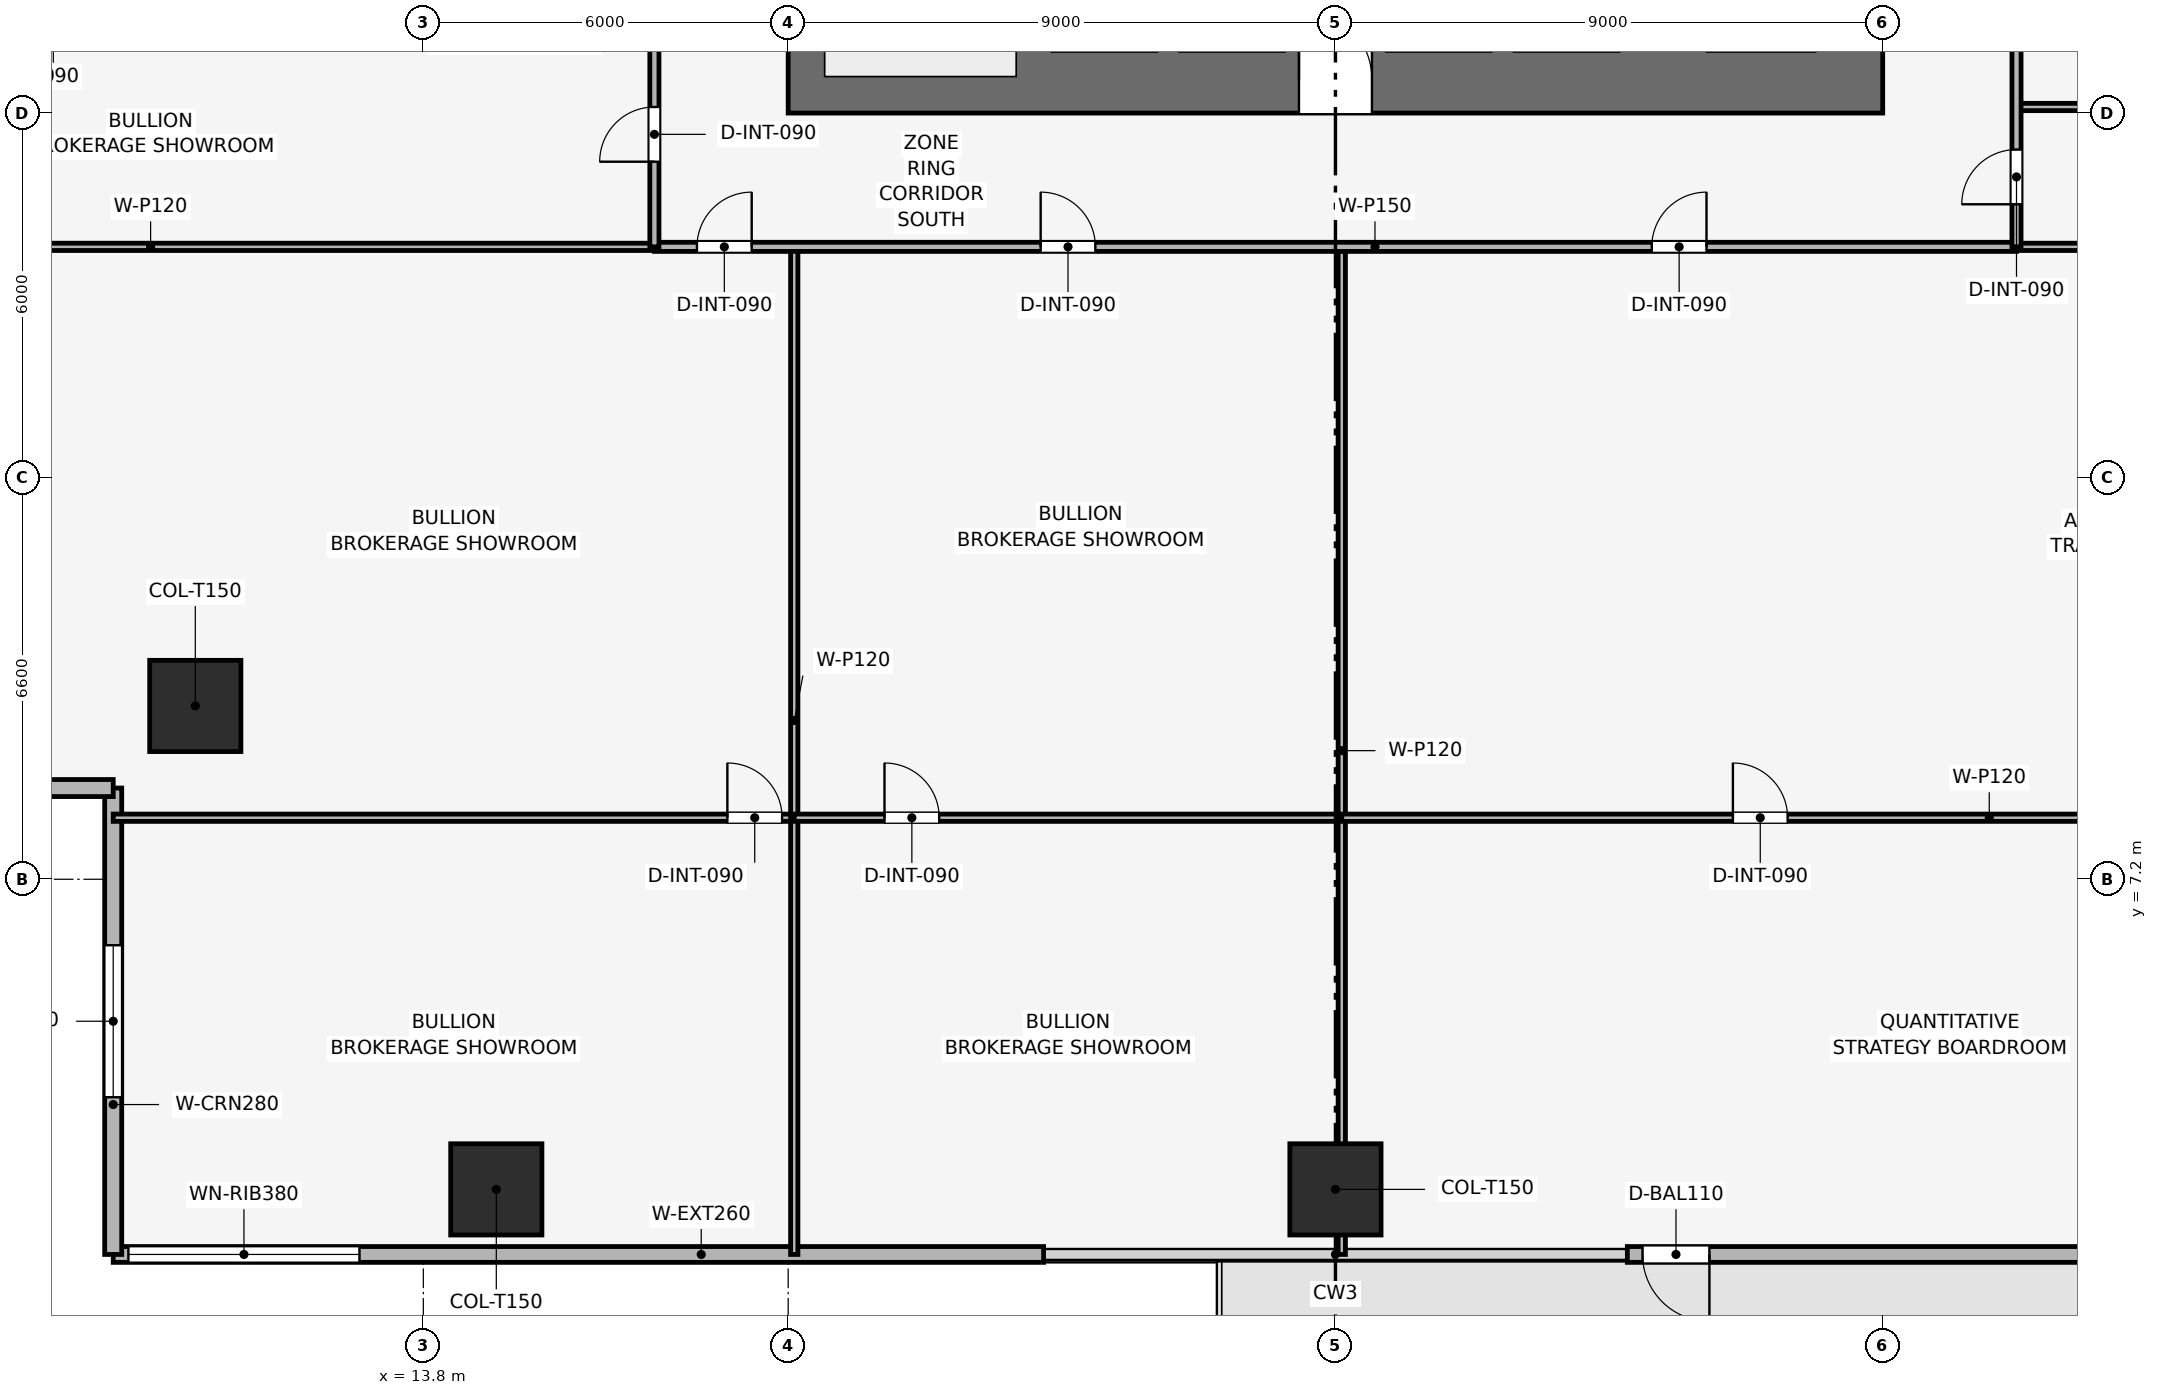
"""IFC4 building model, lengths in metres.
Left out: names, types, materials, properties, quantities, classifications, styles, units other than length and angle.
Written with IfcOpenShell. Run it as: python <this file> out.ifc"""

import sys

from ifc_helpers import new_model, si_unit, direction, frame, frame_2d, origin, origin_2d, place, context, subcontext, project, spatial, rectangle, extrude, element, fill, save


model = new_model("IFC4")
c1 = context("Model", 3, precision=1e-05, world=origin(), true_north=direction((0.0, 1.0)))
c2 = subcontext(c1, "Body", "Model", "MODEL_VIEW")
j1 = project(units=[si_unit("LENGTHUNIT", "METRE"), si_unit("PLANEANGLEUNIT", "RADIAN")], contexts=[c1])
p1 = place(None, origin())
s1 = spatial("IfcSite", under=j1, at=p1, CompositionType="ELEMENT")
p2 = place(p1, origin())
s2 = spatial("IfcBuilding", under=s1, at=p2, CompositionType="ELEMENT")
p3 = place(p2, frame((0.0, 0.0, 49.5)))
s3 = spatial("IfcBuildingStorey", under=s2, at=p3, CompositionType="ELEMENT", Elevation=49.5)
p4 = place(p3, frame((19.8, 20.35, 0.0), z_axis=(0.0, 0.0, 1.0), x_axis=(1.0, 0.0, 0.0)))
e1 = element("IfcWall", 1, at=p4, inside=s3, PredefinedType="SHEAR", context=c2, shape_type="SweptSolid", body=[
    extrude(rectangle(XDim=18.0, YDim=1.1, at=frame_2d((9.0, 0.0))), origin(), (0.0, 0.0, 1.0), 3.9),
])
p5 = place(p4, frame((8.4, 0.0, 0.0)))
e2 = element("IfcOpeningElement", 2, at=p5, cuts=e1, PredefinedType="OPENING", context=c2, shape_type="SweptSolid", body=[
    extrude(rectangle(XDim=1.2, YDim=2.2, at=frame_2d((0.6, 1.1))), frame((0.0, 0.56, 0.0), z_axis=(0.0, -1.0, 0.0), x_axis=(1.0, 0.0, 0.0)), (0.0, 0.0, 1.0), 1.12),
])
for number, where, z_axis, x_axis in (
    (3, (15.0, 2.1, 0.003), (0.0, 0.0, 1.0), (1.0, 0.0, 0.0)),
    (4, (28.8, 2.1, 0.003), (0.0, 0.0, 1.0), (1.0, 0.0, 0.0)),
    (5, (10.05, 10.05, 0.003), (0.0, 0.0, 1.0), (1.0, 0.0, 0.0)),
):
    element("IfcColumn", number, at=place(p3, frame(where, z_axis=z_axis, x_axis=x_axis)), inside=s3, PredefinedType="COLUMN", context=c2, shape_type="SweptSolid", body=[
        extrude(rectangle(XDim=1.5, YDim=1.5, at=origin_2d()), origin(), (0.0, 0.0, 1.0), 3.644),
    ])
p6 = place(p3, frame((48.9, 1.03, 0.0), z_axis=(0.0, 0.0, 1.0), x_axis=(-1.0, 0.0, 0.0)))
e6 = element("IfcWall", 6, at=p6, inside=s3, PredefinedType="SOLIDWALL", context=c2, shape_type="SweptSolid", body=[
    extrude(rectangle(XDim=15.3, YDim=0.26, at=frame_2d((7.65, 0.0))), origin(), (0.0, 0.0, 1.0), 3.65),
])
p7 = place(p6, frame((13.95, 0.0, 0.0)))
e7 = element("IfcOpeningElement", 7, at=p7, cuts=e6, PredefinedType="OPENING", context=c2, shape_type="SweptSolid", body=[
    extrude(rectangle(XDim=1.1, YDim=2.2, at=frame_2d((0.55, 1.1))), frame((0.0, 0.14, 0.0), z_axis=(0.0, -1.0, 0.0), x_axis=(1.0, 0.0, 0.0)), (0.0, 0.0, 1.0), 0.28),
])
p8 = place(p3, frame((24.0, 1.03, 0.0), z_axis=(0.0, 0.0, 1.0), x_axis=(-1.0, 0.0, 0.0)))
e8 = element("IfcWall", 8, at=p8, inside=s3, PredefinedType="SOLIDWALL", context=c2, shape_type="SweptSolid", body=[
    extrude(rectangle(XDim=15.3, YDim=0.26, at=frame_2d((7.65, 0.0))), origin(), (0.0, 0.0, 1.0), 3.65),
])
p9 = place(p8, frame((11.25, 0.0, 0.9)))
e9 = element("IfcOpeningElement", 9, at=p9, cuts=e8, PredefinedType="OPENING", context=c2, shape_type="SweptSolid", body=[
    extrude(rectangle(XDim=3.8, YDim=1.9, at=frame_2d((1.9, 0.95))), frame((0.0, 0.14, 0.0), z_axis=(0.0, -1.0, 0.0), x_axis=(1.0, 0.0, 0.0)), (0.0, 0.0, 1.0), 0.28),
])
p10 = place(p3, frame((8.7, 1.03, 0.0), z_axis=(0.0, 0.0, 1.0), x_axis=(0.0, 1.0, 0.0)))
e10 = element("IfcWall", 10, at=p10, inside=s3, PredefinedType="SOLIDWALL", context=c2, shape_type="SweptSolid", body=[
    extrude(rectangle(XDim=7.67, YDim=0.28, at=frame_2d((3.835, 0.0))), origin(), (0.0, 0.0, 1.0), 3.65),
])
p11 = place(p10, frame((2.585, 0.0, 0.9)))
e11 = element("IfcOpeningElement", 11, at=p11, cuts=e10, PredefinedType="OPENING", context=c2, shape_type="SweptSolid", body=[
    extrude(rectangle(XDim=2.5, YDim=1.9, at=frame_2d((1.25, 0.95))), frame((0.0, 0.15, 0.0), z_axis=(0.0, -1.0, 0.0), x_axis=(1.0, 0.0, 0.0)), (0.0, 0.0, 1.0), 0.3),
])
p12 = place(p3, frame((8.7, 8.7, 0.0), z_axis=(0.0, 0.0, 1.0), x_axis=(-1.0, 0.0, 0.0)))
e12 = element("IfcWall", 12, at=p12, inside=s3, PredefinedType="SOLIDWALL", context=c2, shape_type="SweptSolid", body=[
    extrude(rectangle(XDim=7.67, YDim=0.28, at=frame_2d((3.835, 0.0))), origin(), (0.0, 0.0, 1.0), 3.65),
])
p13 = place(p12, frame((2.585, 0.0, 0.9)))
e13 = element("IfcOpeningElement", 13, at=p13, cuts=e12, PredefinedType="OPENING", context=c2, shape_type="SweptSolid", body=[
    extrude(rectangle(XDim=2.5, YDim=1.9, at=frame_2d((1.25, 0.95))), frame((0.0, 0.15, 0.0), z_axis=(0.0, -1.0, 0.0), x_axis=(1.0, 0.0, 0.0)), (0.0, 0.0, 1.0), 0.3),
])
p14 = place(p3, frame((8.7, 8.212, 0.0), z_axis=(0.0, 0.0, 1.0), x_axis=(1.0, 0.0, 0.0)))
e14 = element("IfcWall", 14, at=p14, inside=s3, PredefinedType="PARTITIONING", context=c2, shape_type="SweptSolid", body=[
    extrude(rectangle(XDim=11.2, YDim=0.12, at=frame_2d((5.6, 0.0))), origin(), (0.0, 0.0, 1.0), 2.935),
])
p15 = place(p14, frame((10.1, 0.0, 0.0)))
e15 = element("IfcOpeningElement", 15, at=p15, cuts=e14, PredefinedType="OPENING", context=c2, shape_type="SweptSolid", body=[
    extrude(rectangle(XDim=0.9, YDim=2.1, at=frame_2d((0.45, 1.05))), frame((0.0, 0.07, 0.0), z_axis=(0.0, -1.0, 0.0), x_axis=(1.0, 0.0, 0.0)), (0.0, 0.0, 1.0), 0.14),
])
p16 = place(p3, frame((19.9, 1.03, 0.0), z_axis=(0.0, 0.0, 1.0), x_axis=(0.0, 1.0, 0.0)))
e16 = element("IfcWall", 16, at=p16, inside=s3, PredefinedType="PARTITIONING", context=c2, shape_type="SweptSolid", body=[
    extrude(rectangle(XDim=16.57, YDim=0.12, at=frame_2d((8.285, 0.0))), origin(), (0.0, 0.0, 1.0), 2.935),
])
p17 = place(p3, frame((19.9, 8.212, 0.0), z_axis=(0.0, 0.0, 1.0), x_axis=(1.0, 0.0, 0.0)))
e17 = element("IfcWall", 17, at=p17, inside=s3, PredefinedType="PARTITIONING", context=c2, shape_type="SweptSolid", body=[
    extrude(rectangle(XDim=9.004, YDim=0.12, at=frame_2d((4.502, 0.0))), origin(), (0.0, 0.0, 1.0), 3.085),
])
p18 = place(p17, frame((1.484, 0.0, 0.0)))
e18 = element("IfcOpeningElement", 18, at=p18, cuts=e17, PredefinedType="OPENING", context=c2, shape_type="SweptSolid", body=[
    extrude(rectangle(XDim=0.9, YDim=2.1, at=frame_2d((0.45, 1.05))), frame((0.0, 0.07, 0.0), z_axis=(0.0, -1.0, 0.0), x_axis=(1.0, 0.0, 0.0)), (0.0, 0.0, 1.0), 0.14),
])
p19 = place(p3, frame((28.904, 1.03, 0.0), z_axis=(0.0, 0.0, 1.0), x_axis=(0.0, 1.0, 0.0)))
e19 = element("IfcWall", 19, at=p19, inside=s3, PredefinedType="PARTITIONING", context=c2, shape_type="SweptSolid", body=[
    extrude(rectangle(XDim=16.57, YDim=0.12, at=frame_2d((8.285, 0.0))), origin(), (0.0, 0.0, 1.0), 3.085),
])
p20 = place(p3, frame((28.904, 8.212, 0.0), z_axis=(0.0, 0.0, 1.0), x_axis=(1.0, 0.0, 0.0)))
e20 = element("IfcWall", 20, at=p20, inside=s3, PredefinedType="PARTITIONING", context=c2, shape_type="SweptSolid", body=[
    extrude(rectangle(XDim=19.996, YDim=0.12, at=frame_2d((9.998, 0.0))), origin(), (0.0, 0.0, 1.0), 2.935),
])
p21 = place(p20, frame((6.432, 0.0, 0.0)))
e21 = element("IfcOpeningElement", 21, at=p21, cuts=e20, PredefinedType="OPENING", context=c2, shape_type="SweptSolid", body=[
    extrude(rectangle(XDim=0.9, YDim=2.1, at=frame_2d((0.45, 1.05))), frame((0.0, 0.07, 0.0), z_axis=(0.0, -1.0, 0.0), x_axis=(1.0, 0.0, 0.0)), (0.0, 0.0, 1.0), 0.14),
])
for number, where, z_axis, x_axis in (
    (22, (1.03, 17.6, 0.0), (0.0, 0.0, 1.0), (1.0, 0.0, 0.0)),
    (23, (40.0, 17.6, 0.0), (0.0, 0.0, 1.0), (1.0, 0.0, 0.0)),
    (24, (40.0, 19.9, 0.0), (0.0, 0.0, 1.0), (1.0, 0.0, 0.0)),
):
    element("IfcWall", number, at=place(p3, frame(where, z_axis=z_axis, x_axis=x_axis)), inside=s3, PredefinedType="PARTITIONING", context=c2, shape_type="SweptSolid", body=[
        extrude(rectangle(XDim=16.57, YDim=0.12, at=frame_2d((8.285, 0.0))), origin(), (0.0, 0.0, 1.0), 2.935),
    ])
p22 = place(p3, frame((17.6, 17.6, 0.0), z_axis=(0.0, 0.0, 1.0), x_axis=(1.0, 0.0, 0.0)))
e25 = element("IfcWall", 25, at=p22, inside=s3, PredefinedType="PARTITIONING", context=c2, shape_type="SweptSolid", body=[
    extrude(rectangle(XDim=22.4, YDim=0.15, at=frame_2d((11.2, 0.0))), origin(), (0.0, 0.0, 1.0), 3.085),
])
p23 = place(p22, frame((0.7, 0.0, 0.0)))
e26 = element("IfcOpeningElement", 26, at=p23, cuts=e25, PredefinedType="OPENING", context=c2, shape_type="SweptSolid", body=[
    extrude(rectangle(XDim=0.9, YDim=2.1, at=frame_2d((0.45, 1.05))), frame((0.0, 0.085, 0.0), z_axis=(0.0, -1.0, 0.0), x_axis=(1.0, 0.0, 0.0)), (0.0, 0.0, 1.0), 0.17),
])
p24 = place(p22, frame((6.352, 0.0, 0.0)))
e27 = element("IfcOpeningElement", 27, at=p24, cuts=e25, PredefinedType="OPENING", context=c2, shape_type="SweptSolid", body=[
    extrude(rectangle(XDim=0.9, YDim=2.1, at=frame_2d((0.45, 1.05))), frame((0.0, 0.085, 0.0), z_axis=(0.0, -1.0, 0.0), x_axis=(1.0, 0.0, 0.0)), (0.0, 0.0, 1.0), 0.17),
])
p25 = place(p22, frame((16.402, 0.0, 0.0)))
e28 = element("IfcOpeningElement", 28, at=p25, cuts=e25, PredefinedType="OPENING", context=c2, shape_type="SweptSolid", body=[
    extrude(rectangle(XDim=0.9, YDim=2.1, at=frame_2d((0.45, 1.05))), frame((0.0, 0.085, 0.0), z_axis=(0.0, -1.0, 0.0), x_axis=(1.0, 0.0, 0.0)), (0.0, 0.0, 1.0), 0.17),
])
p26 = place(p3, frame((17.6, 17.6, 0.0), z_axis=(0.0, 0.0, 1.0), x_axis=(0.0, 1.0, 0.0)))
e29 = element("IfcWall", 29, at=p26, inside=s3, PredefinedType="PARTITIONING", context=c2, shape_type="SweptSolid", body=[
    extrude(rectangle(XDim=22.4, YDim=0.15, at=frame_2d((11.2, 0.0))), origin(), (0.0, 0.0, 1.0), 3.085),
])
p27 = place(p26, frame((1.4, 0.0, 0.0)))
e30 = element("IfcOpeningElement", 30, at=p27, cuts=e29, PredefinedType="OPENING", context=c2, shape_type="SweptSolid", body=[
    extrude(rectangle(XDim=0.9, YDim=2.1, at=frame_2d((0.45, 1.05))), frame((0.0, 0.085, 0.0), z_axis=(0.0, -1.0, 0.0), x_axis=(1.0, 0.0, 0.0)), (0.0, 0.0, 1.0), 0.17),
])
p28 = place(p26, frame((4.65, 0.0, 0.0)))
e31 = element("IfcOpeningElement", 31, at=p28, cuts=e29, PredefinedType="OPENING", context=c2, shape_type="SweptSolid", body=[
    extrude(rectangle(XDim=0.9, YDim=2.1, at=frame_2d((0.45, 1.05))), frame((0.0, 0.085, 0.0), z_axis=(0.0, -1.0, 0.0), x_axis=(1.0, 0.0, 0.0)), (0.0, 0.0, 1.0), 0.17),
])
p29 = place(p26, frame((7.55, 0.0, 0.0)))
e32 = element("IfcOpeningElement", 32, at=p29, cuts=e29, PredefinedType="OPENING", context=c2, shape_type="SweptSolid", body=[
    extrude(rectangle(XDim=0.9, YDim=2.1, at=frame_2d((0.45, 1.05))), frame((0.0, 0.085, 0.0), z_axis=(0.0, -1.0, 0.0), x_axis=(1.0, 0.0, 0.0)), (0.0, 0.0, 1.0), 0.17),
])
p30 = place(p26, frame((10.3, 0.0, 0.0)))
e33 = element("IfcOpeningElement", 33, at=p30, cuts=e29, PredefinedType="OPENING", context=c2, shape_type="SweptSolid", body=[
    extrude(rectangle(XDim=0.95, YDim=2.1, at=frame_2d((0.475, 1.05))), frame((0.0, 0.085, 0.0), z_axis=(0.0, -1.0, 0.0), x_axis=(1.0, 0.0, 0.0)), (0.0, 0.0, 1.0), 0.17),
])
p31 = place(p26, frame((16.8, 0.0, 0.0)))
e34 = element("IfcOpeningElement", 34, at=p31, cuts=e29, PredefinedType="OPENING", context=c2, shape_type="SweptSolid", body=[
    extrude(rectangle(XDim=0.9, YDim=2.1, at=frame_2d((0.45, 1.05))), frame((0.0, 0.085, 0.0), z_axis=(0.0, -1.0, 0.0), x_axis=(1.0, 0.0, 0.0)), (0.0, 0.0, 1.0), 0.17),
])
p32 = place(p3, frame((40.0, 17.6, 0.0), z_axis=(0.0, 0.0, 1.0), x_axis=(0.0, 1.0, 0.0)))
e35 = element("IfcWall", 35, at=p32, inside=s3, PredefinedType="PARTITIONING", context=c2, shape_type="SweptSolid", body=[
    extrude(rectangle(XDim=22.4, YDim=0.15, at=frame_2d((11.2, 0.0))), origin(), (0.0, 0.0, 1.0), 3.085),
])
p33 = place(p32, frame((0.7, 0.0, 0.0)))
e36 = element("IfcOpeningElement", 36, at=p33, cuts=e35, PredefinedType="OPENING", context=c2, shape_type="SweptSolid", body=[
    extrude(rectangle(XDim=0.9, YDim=2.1, at=frame_2d((0.45, 1.05))), frame((0.0, 0.085, 0.0), z_axis=(0.0, -1.0, 0.0), x_axis=(1.0, 0.0, 0.0)), (0.0, 0.0, 1.0), 0.17),
])
p34 = place(p32, frame((4.927, 0.0, 0.0)))
e37 = element("IfcOpeningElement", 37, at=p34, cuts=e35, PredefinedType="OPENING", context=c2, shape_type="SweptSolid", body=[
    extrude(rectangle(XDim=0.9, YDim=2.1, at=frame_2d((0.45, 1.05))), frame((0.0, 0.085, 0.0), z_axis=(0.0, -1.0, 0.0), x_axis=(1.0, 0.0, 0.0)), (0.0, 0.0, 1.0), 0.17),
])
p35 = place(p32, frame((10.886, 0.0, 0.0)))
e38 = element("IfcOpeningElement", 38, at=p35, cuts=e35, PredefinedType="OPENING", context=c2, shape_type="SweptSolid", body=[
    extrude(rectangle(XDim=0.9, YDim=2.1, at=frame_2d((0.45, 1.05))), frame((0.0, 0.085, 0.0), z_axis=(0.0, -1.0, 0.0), x_axis=(1.0, 0.0, 0.0)), (0.0, 0.0, 1.0), 0.17),
])
p36 = place(p32, frame((17.859, 0.0, 0.0)))
e39 = element("IfcOpeningElement", 39, at=p36, cuts=e35, PredefinedType="OPENING", context=c2, shape_type="SweptSolid", body=[
    extrude(rectangle(XDim=0.9, YDim=2.1, at=frame_2d((0.45, 1.05))), frame((0.0, 0.085, 0.0), z_axis=(0.0, -1.0, 0.0), x_axis=(1.0, 0.0, 0.0)), (0.0, 0.0, 1.0), 0.17),
])
p37 = place(p7, origin())
e40 = element("IfcDoor", 40, at=p37, inside=s3, OperationType="SINGLE_SWING_LEFT", PredefinedType="DOOR", context=c2, shape_type="SweptSolid", body=[
    extrude(rectangle(XDim=1.1, YDim=2.2, at=frame_2d((0.55, 1.1))), frame((0.0, 0.025, 0.0), z_axis=(0.0, -1.0, 0.0), x_axis=(1.0, 0.0, 0.0)), (0.0, 0.0, 1.0), 0.05),
])
fill(e7, e40)
p38 = place(p9, origin())
e41 = element("IfcWindow", 41, at=p38, inside=s3, PartitioningType="SINGLE_PANEL", PredefinedType="WINDOW", context=c2, shape_type="SweptSolid", body=[
    extrude(rectangle(XDim=3.8, YDim=1.9, at=frame_2d((1.9, 0.95))), frame((0.0, 0.03, 0.0), z_axis=(0.0, -1.0, 0.0), x_axis=(1.0, 0.0, 0.0)), (0.0, 0.0, 1.0), 0.06),
])
fill(e9, e41)
p39 = place(p11, origin())
e42 = element("IfcWindow", 42, at=p39, inside=s3, PartitioningType="SINGLE_PANEL", PredefinedType="WINDOW", context=c2, shape_type="SweptSolid", body=[
    extrude(rectangle(XDim=2.5, YDim=1.9, at=frame_2d((1.25, 0.95))), frame((0.0, 0.03, 0.0), z_axis=(0.0, -1.0, 0.0), x_axis=(1.0, 0.0, 0.0)), (0.0, 0.0, 1.0), 0.06),
])
fill(e11, e42)
p40 = place(p15, origin())
e43 = element("IfcDoor", 43, at=p40, inside=s3, OperationType="SINGLE_SWING_LEFT", PredefinedType="DOOR", context=c2, shape_type="SweptSolid", body=[
    extrude(rectangle(XDim=0.9, YDim=2.1, at=frame_2d((0.45, 1.05))), frame((0.0, 0.025, 0.0), z_axis=(0.0, -1.0, 0.0), x_axis=(1.0, 0.0, 0.0)), (0.0, 0.0, 1.0), 0.05),
])
fill(e15, e43)
p41 = place(p18, origin())
e44 = element("IfcDoor", 44, at=p41, inside=s3, OperationType="SINGLE_SWING_LEFT", PredefinedType="DOOR", context=c2, shape_type="SweptSolid", body=[
    extrude(rectangle(XDim=0.9, YDim=2.1, at=frame_2d((0.45, 1.05))), frame((0.0, 0.025, 0.0), z_axis=(0.0, -1.0, 0.0), x_axis=(1.0, 0.0, 0.0)), (0.0, 0.0, 1.0), 0.05),
])
fill(e18, e44)
p42 = place(p21, origin())
e45 = element("IfcDoor", 45, at=p42, inside=s3, OperationType="SINGLE_SWING_LEFT", PredefinedType="DOOR", context=c2, shape_type="SweptSolid", body=[
    extrude(rectangle(XDim=0.9, YDim=2.1, at=frame_2d((0.45, 1.05))), frame((0.0, 0.025, 0.0), z_axis=(0.0, -1.0, 0.0), x_axis=(1.0, 0.0, 0.0)), (0.0, 0.0, 1.0), 0.05),
])
fill(e21, e45)
p43 = place(p23, origin())
e46 = element("IfcDoor", 46, at=p43, inside=s3, OperationType="SINGLE_SWING_RIGHT", PredefinedType="DOOR", context=c2, shape_type="SweptSolid", body=[
    extrude(rectangle(XDim=0.9, YDim=2.1, at=frame_2d((0.45, 1.05))), frame((0.0, 0.025, 0.0), z_axis=(0.0, -1.0, 0.0), x_axis=(1.0, 0.0, 0.0)), (0.0, 0.0, 1.0), 0.05),
])
fill(e26, e46)
p44 = place(p24, origin())
e47 = element("IfcDoor", 47, at=p44, inside=s3, OperationType="SINGLE_SWING_LEFT", PredefinedType="DOOR", context=c2, shape_type="SweptSolid", body=[
    extrude(rectangle(XDim=0.9, YDim=2.1, at=frame_2d((0.45, 1.05))), frame((0.0, 0.025, 0.0), z_axis=(0.0, -1.0, 0.0), x_axis=(1.0, 0.0, 0.0)), (0.0, 0.0, 1.0), 0.05),
])
fill(e27, e47)
p45 = place(p25, origin())
e48 = element("IfcDoor", 48, at=p45, inside=s3, OperationType="SINGLE_SWING_RIGHT", PredefinedType="DOOR", context=c2, shape_type="SweptSolid", body=[
    extrude(rectangle(XDim=0.9, YDim=2.1, at=frame_2d((0.45, 1.05))), frame((0.0, 0.025, 0.0), z_axis=(0.0, -1.0, 0.0), x_axis=(1.0, 0.0, 0.0)), (0.0, 0.0, 1.0), 0.05),
])
fill(e28, e48)
p46 = place(p27, origin())
e49 = element("IfcDoor", 49, at=p46, inside=s3, OperationType="SINGLE_SWING_LEFT", PredefinedType="DOOR", context=c2, shape_type="SweptSolid", body=[
    extrude(rectangle(XDim=0.9, YDim=2.1, at=frame_2d((0.45, 1.05))), frame((0.0, 0.025, 0.0), z_axis=(0.0, -1.0, 0.0), x_axis=(1.0, 0.0, 0.0)), (0.0, 0.0, 1.0), 0.05),
])
fill(e30, e49)
p47 = place(p33, origin())
e50 = element("IfcDoor", 50, at=p47, inside=s3, OperationType="SINGLE_SWING_LEFT", PredefinedType="DOOR", context=c2, shape_type="SweptSolid", body=[
    extrude(rectangle(XDim=0.9, YDim=2.1, at=frame_2d((0.45, 1.05))), frame((0.0, 0.025, 0.0), z_axis=(0.0, -1.0, 0.0), x_axis=(1.0, 0.0, 0.0)), (0.0, 0.0, 1.0), 0.05),
])
fill(e36, e50)
p48 = place(p5, origin())
e51 = element("IfcDoor", 51, at=p48, inside=s3, OperationType="SINGLE_SWING_LEFT", PredefinedType="DOOR", context=c2, shape_type="SweptSolid", body=[
    extrude(rectangle(XDim=1.2, YDim=2.2, at=frame_2d((0.6, 1.1))), frame((0.0, 0.025, 0.0), z_axis=(0.0, -1.0, 0.0), x_axis=(1.0, 0.0, 0.0)), (0.0, 0.0, 1.0), 0.05),
])
fill(e2, e51)
save(model, sys.argv[1])
